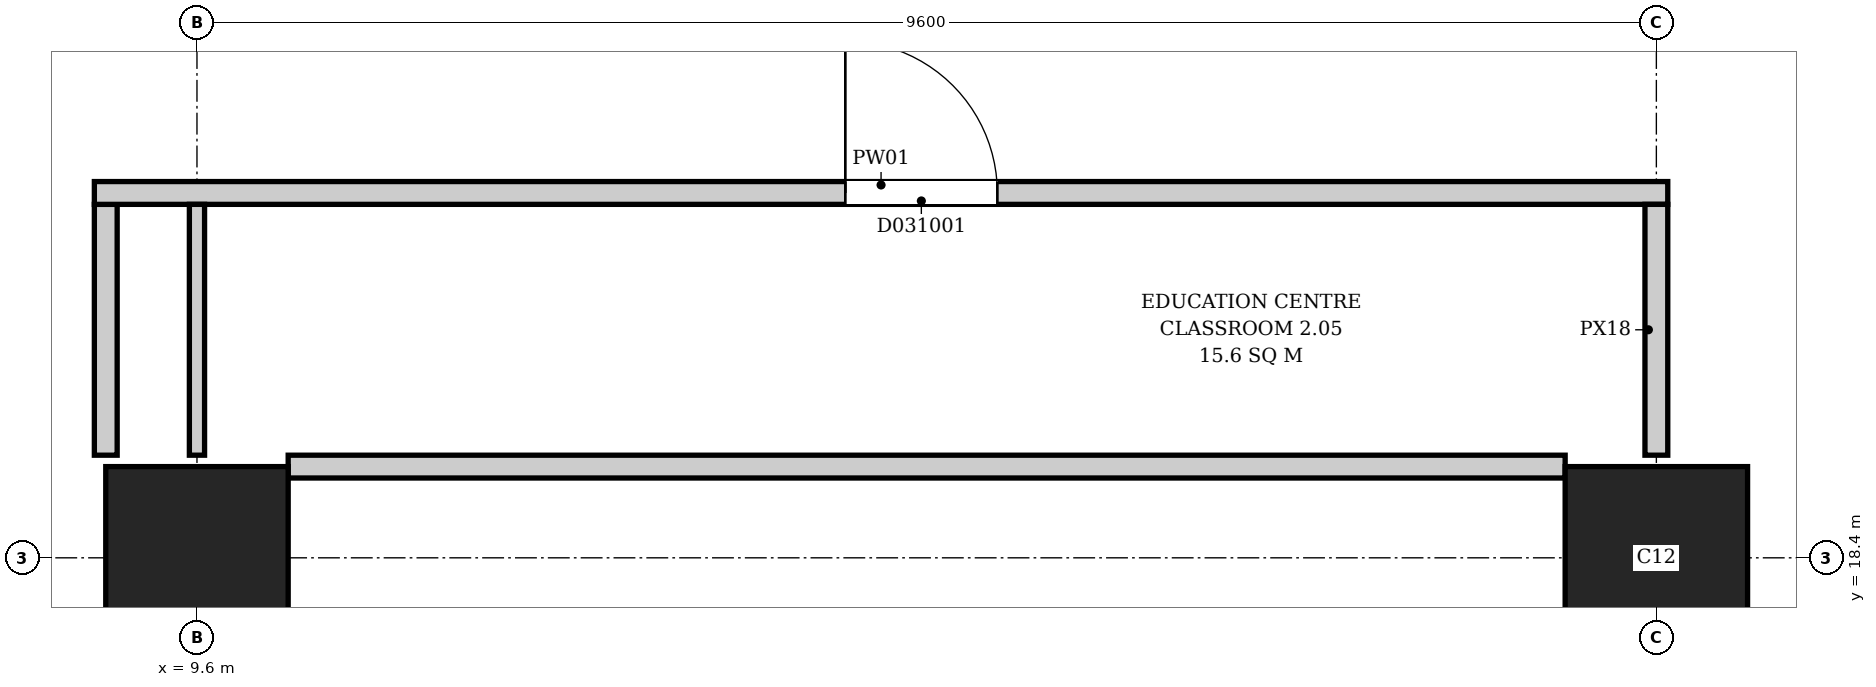
"""IFC4 building model, lengths in metres.
Left out: names, types, materials, properties, quantities, classifications, styles, units other than length and angle.
Written with IfcOpenShell. Run it as: python <this file> out.ifc"""

import sys

from ifc_helpers import new_model, si_unit, direction, frame, frame_2d, origin, origin_2d, place, context, subcontext, project, spatial, rectangle, extrude, element, fill, save


model = new_model("IFC4")
c1 = context("Model", 3, precision=1e-05, world=origin(), true_north=direction((0.0, 1.0)))
c2 = subcontext(c1, "Body", "Model", "MODEL_VIEW")
j1 = project(units=[si_unit("LENGTHUNIT", "METRE"), si_unit("PLANEANGLEUNIT", "RADIAN")], contexts=[c1])
p1 = place(None, origin())
s1 = spatial("IfcSite", under=j1, at=p1, CompositionType="ELEMENT")
p2 = place(p1, origin())
s2 = spatial("IfcBuilding", under=s1, at=p2, CompositionType="ELEMENT")
p3 = place(p2, frame((0.0, 0.0, 14.2)))
s3 = spatial("IfcBuildingStorey", under=s2, at=p3, CompositionType="ELEMENT", Elevation=14.2)
for number, where, z_axis, x_axis in (
    (1, (9.6, 18.4, 0.0), (0.0, 0.0, 1.0), (1.0, 0.0, 0.0)),
    (2, (19.2, 18.4, 0.0), (0.0, 0.0, 1.0), (1.0, 0.0, 0.0)),
):
    element("IfcColumn", number, at=place(p3, frame(where, z_axis=z_axis, x_axis=x_axis)), inside=s3, PredefinedType="COLUMN", context=c2, shape_type="SweptSolid", body=[
        extrude(rectangle(XDim=1.2, YDim=1.2, at=origin_2d()), origin(), (0.0, 0.0, 1.0), 7.5),
    ])
p4 = place(p3, frame((9.0, 19.075, 0.0), z_axis=(0.0, 0.0, 1.0), x_axis=(0.0, 1.0, 0.0)))
e3 = element("IfcWall", 3, at=p4, inside=s3, PredefinedType="PARTITIONING", context=c2, shape_type="SweptSolid", body=[
    extrude(rectangle(XDim=1.65, YDim=0.15, at=frame_2d((0.825, 0.0))), origin(), (0.0, 0.0, 1.0), 7.15),
])
p5 = place(p3, frame((8.925, 20.8, 0.0), z_axis=(0.0, 0.0, 1.0), x_axis=(1.0, 0.0, 0.0)))
e4 = element("IfcWall", 4, at=p5, inside=s3, PredefinedType="PARTITIONING", context=c2, shape_type="SweptSolid", body=[
    extrude(rectangle(XDim=10.35, YDim=0.15, at=frame_2d((5.175, 0.0))), origin(), (0.0, 0.0, 1.0), 7.15),
])
p6 = place(p5, frame((4.94, 0.0, 0.0)))
e5 = element("IfcOpeningElement", 5, at=p6, cuts=e4, PredefinedType="OPENING", context=c2, shape_type="SweptSolid", body=[
    extrude(rectangle(XDim=1.0, YDim=2.1, at=frame_2d((0.5, 1.05))), frame((0.0, 0.085, 0.0), z_axis=(0.0, -1.0, 0.0), x_axis=(1.0, 0.0, 0.0)), (0.0, 0.0, 1.0), 0.17),
])
p7 = place(p3, frame((9.6, 19.075, 0.0), z_axis=(0.0, 0.0, 1.0), x_axis=(0.0, 1.0, 0.0)))
e6 = element("IfcWall", 6, at=p7, inside=s3, PredefinedType="PARTITIONING", context=c2, shape_type="SweptSolid", body=[
    extrude(rectangle(XDim=1.65, YDim=0.1, at=frame_2d((0.825, 0.0))), origin(), (0.0, 0.0, 1.0), 6.75),
])
p8 = place(p3, frame((10.2, 19.0, 0.0), z_axis=(0.0, 0.0, 1.0), x_axis=(1.0, 0.0, 0.0)))
e7 = element("IfcWall", 7, at=p8, inside=s3, PredefinedType="PARTITIONING", context=c2, shape_type="SweptSolid", body=[
    extrude(rectangle(XDim=8.4, YDim=0.15, at=frame_2d((4.2, 0.0))), origin(), (0.0, 0.0, 1.0), 7.15),
])
p9 = place(p3, frame((19.2, 19.075, 0.0), z_axis=(0.0, 0.0, 1.0), x_axis=(0.0, 1.0, 0.0)))
e8 = element("IfcWall", 8, at=p9, inside=s3, PredefinedType="PARTITIONING", context=c2, shape_type="SweptSolid", body=[
    extrude(rectangle(XDim=1.65, YDim=0.15, at=frame_2d((0.825, 0.0))), origin(), (0.0, 0.0, 1.0), 6.75),
])
p10 = place(p6, origin())
e9 = element("IfcDoor", 9, at=p10, inside=s3, OperationType="SINGLE_SWING_LEFT", PredefinedType="DOOR", context=c2, shape_type="SweptSolid", body=[
    extrude(rectangle(XDim=1.0, YDim=2.1, at=frame_2d((0.5, 1.05))), frame((0.0, 0.025, 0.0), z_axis=(0.0, -1.0, 0.0), x_axis=(1.0, 0.0, 0.0)), (0.0, 0.0, 1.0), 0.05),
])
fill(e5, e9)
save(model, sys.argv[1])
